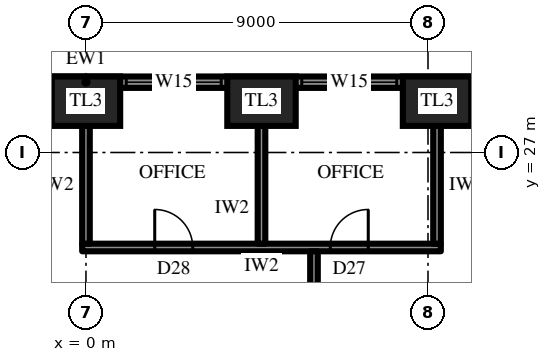
"""IFC4 building model, lengths in metres.
Left out: names, types, materials, properties, quantities, classifications, styles, units other than length and angle.
Written with IfcOpenShell. Run it as: python <this file> out.ifc"""

import sys

from ifc_helpers import new_model, si_unit, direction, frame, frame_2d, origin, origin_2d, place, context, subcontext, project, spatial, rectangle, extrude, element, fill, save


model = new_model("IFC4")
c1 = context("Model", 3, precision=1e-05, world=origin(), true_north=direction((0.0, 1.0)))
c2 = subcontext(c1, "Body", "Model", "MODEL_VIEW")
j1 = project(units=[si_unit("LENGTHUNIT", "METRE"), si_unit("PLANEANGLEUNIT", "RADIAN")], contexts=[c1])
p1 = place(None, origin())
s1 = spatial("IfcSite", under=j1, at=p1, CompositionType="ELEMENT")
p2 = place(p1, origin())
s2 = spatial("IfcBuilding", under=s1, at=p2, CompositionType="ELEMENT")
p3 = place(p2, frame((0.0, 0.0, 295.3)))
s3 = spatial("IfcBuildingStorey", under=s2, at=p3, CompositionType="ELEMENT", Elevation=295.3)
for number, where, z_axis, x_axis in (
    (1, (9.238, 28.35, 0.0), (0.0, 0.0, 1.0), (-1.0, 0.0, 0.0)),
    (2, (4.619, 28.35, 0.0), (0.0, 0.0, 1.0), (-1.0, 0.0, 0.0)),
    (3, (0.0, 28.35, 0.0), (0.0, 0.0, 1.0), (-1.0, 0.0, 0.0)),
):
    element("IfcColumn", number, at=place(p3, frame(where, z_axis=z_axis, x_axis=x_axis)), inside=s3, PredefinedType="COLUMN", context=c2, shape_type="SweptSolid", body=[
        extrude(rectangle(XDim=1.8, YDim=1.3, at=origin_2d()), origin(), (0.0, 0.0, 1.0), 4.2),
    ])
p4 = place(p3, frame((13.856, 28.85, 0.0), z_axis=(0.0, 0.0, 1.0), x_axis=(-1.0, 0.0, 0.0)))
e4 = element("IfcWall", 4, at=p4, inside=s3, PredefinedType="SOLIDWALL", context=c2, shape_type="SweptSolid", body=[
    extrude(rectangle(XDim=27.713, YDim=0.3, at=frame_2d((13.856, 0.0))), origin(), (0.0, 0.0, 1.0), 1.9),
])
p5 = place(p4, frame((1.059, 0.0, 0.6)))
e5 = element("IfcOpeningElement", 5, at=p5, cuts=e4, PredefinedType="OPENING", context=c2, shape_type="SweptSolid", body=[
    extrude(rectangle(XDim=2.5, YDim=1.05, at=frame_2d((1.25, 0.525))), frame((0.0, 0.16, 0.0), z_axis=(0.0, -1.0, 0.0), x_axis=(1.0, 0.0, 0.0)), (0.0, 0.0, 1.0), 0.32),
])
p6 = place(p4, frame((5.678, 0.0, 0.6)))
e6 = element("IfcOpeningElement", 6, at=p6, cuts=e4, PredefinedType="OPENING", context=c2, shape_type="SweptSolid", body=[
    extrude(rectangle(XDim=2.5, YDim=1.05, at=frame_2d((1.25, 0.525))), frame((0.0, 0.16, 0.0), z_axis=(0.0, -1.0, 0.0), x_axis=(1.0, 0.0, 0.0)), (0.0, 0.0, 1.0), 0.32),
])
p7 = place(p4, frame((10.297, 0.0, 0.6)))
e7 = element("IfcOpeningElement", 7, at=p7, cuts=e4, PredefinedType="OPENING", context=c2, shape_type="SweptSolid", body=[
    extrude(rectangle(XDim=2.5, YDim=1.05, at=frame_2d((1.25, 0.525))), frame((0.0, 0.16, 0.0), z_axis=(0.0, -1.0, 0.0), x_axis=(1.0, 0.0, 0.0)), (0.0, 0.0, 1.0), 0.32),
])
p8 = place(p4, frame((14.916, 0.0, 0.6)))
e8 = element("IfcOpeningElement", 8, at=p8, cuts=e4, PredefinedType="OPENING", context=c2, shape_type="SweptSolid", body=[
    extrude(rectangle(XDim=2.5, YDim=1.05, at=frame_2d((1.25, 0.525))), frame((0.0, 0.16, 0.0), z_axis=(0.0, -1.0, 0.0), x_axis=(1.0, 0.0, 0.0)), (0.0, 0.0, 1.0), 0.32),
])
p9 = place(p4, frame((19.535, 0.0, 0.6)))
e9 = element("IfcOpeningElement", 9, at=p9, cuts=e4, PredefinedType="OPENING", context=c2, shape_type="SweptSolid", body=[
    extrude(rectangle(XDim=2.5, YDim=1.05, at=frame_2d((1.25, 0.525))), frame((0.0, 0.16, 0.0), z_axis=(0.0, -1.0, 0.0), x_axis=(1.0, 0.0, 0.0)), (0.0, 0.0, 1.0), 0.32),
])
p10 = place(p4, frame((24.153, 0.0, 0.6)))
e10 = element("IfcOpeningElement", 10, at=p10, cuts=e4, PredefinedType="OPENING", context=c2, shape_type="SweptSolid", body=[
    extrude(rectangle(XDim=2.5, YDim=1.05, at=frame_2d((1.25, 0.525))), frame((0.0, 0.16, 0.0), z_axis=(0.0, -1.0, 0.0), x_axis=(1.0, 0.0, 0.0)), (0.0, 0.0, 1.0), 0.32),
])
p11 = place(p3, frame((9.338, 24.5, 0.0), z_axis=(0.0, 0.0, 1.0), x_axis=(-1.0, 0.0, 0.0)))
e11 = element("IfcWall", 11, at=p11, inside=s3, PredefinedType="PARTITIONING", context=c2, shape_type="SweptSolid", body=[
    extrude(rectangle(XDim=9.438, YDim=0.2, at=frame_2d((4.719, 0.0))), origin(), (0.0, 0.0, 1.0), 3.9),
])
p12 = place(p11, frame((1.909, 0.0, 0.0)))
e12 = element("IfcOpeningElement", 12, at=p12, cuts=e11, PredefinedType="OPENING", context=c2, shape_type="SweptSolid", body=[
    extrude(rectangle(XDim=1.0, YDim=2.2, at=frame_2d((0.5, 1.1))), frame((0.0, 0.11, 0.0), z_axis=(0.0, -1.0, 0.0), x_axis=(1.0, 0.0, 0.0)), (0.0, 0.0, 1.0), 0.22),
])
p13 = place(p11, frame((6.528, 0.0, 0.0)))
e13 = element("IfcOpeningElement", 13, at=p13, cuts=e11, PredefinedType="OPENING", context=c2, shape_type="SweptSolid", body=[
    extrude(rectangle(XDim=1.0, YDim=2.2, at=frame_2d((0.5, 1.1))), frame((0.0, 0.11, 0.0), z_axis=(0.0, -1.0, 0.0), x_axis=(1.0, 0.0, 0.0)), (0.0, 0.0, 1.0), 0.22),
])
for number, where, z_axis, x_axis in (
    (14, (9.238, 24.6, 0.0), (0.0, 0.0, 1.0), (0.0, 1.0, 0.0)),
    (15, (4.619, 24.6, 0.0), (0.0, 0.0, 1.0), (0.0, 1.0, 0.0)),
    (16, (0.0, 24.6, 0.0), (0.0, 0.0, 1.0), (0.0, 1.0, 0.0)),
):
    element("IfcWall", number, at=place(p3, frame(where, z_axis=z_axis, x_axis=x_axis)), inside=s3, PredefinedType="PARTITIONING", context=c2, shape_type="SweptSolid", body=[
        extrude(rectangle(XDim=3.1, YDim=0.2, at=frame_2d((1.55, 0.0))), origin(), (0.0, 0.0, 1.0), 2.844),
    ])
p14 = place(p3, frame((6.0, 17.7, 0.0), z_axis=(0.0, 0.0, 1.0), x_axis=(0.0, 1.0, 0.0)))
e17 = element("IfcWall", 17, at=p14, inside=s3, PredefinedType="PARTITIONING", context=c2, shape_type="SweptSolid", body=[
    extrude(rectangle(XDim=6.7, YDim=0.2, at=frame_2d((3.35, 0.0))), origin(), (0.0, 0.0, 1.0), 3.9),
])
p15 = place(p6, origin())
e18 = element("IfcWindow", 18, at=p15, inside=s3, PartitioningType="SINGLE_PANEL", PredefinedType="WINDOW", context=c2, shape_type="SweptSolid", body=[
    extrude(rectangle(XDim=2.5, YDim=1.05, at=frame_2d((1.25, 0.525))), frame((0.0, 0.03, 0.0), z_axis=(0.0, -1.0, 0.0), x_axis=(1.0, 0.0, 0.0)), (0.0, 0.0, 1.0), 0.06),
])
fill(e6, e18)
p16 = place(p7, origin())
e19 = element("IfcWindow", 19, at=p16, inside=s3, PartitioningType="SINGLE_PANEL", PredefinedType="WINDOW", context=c2, shape_type="SweptSolid", body=[
    extrude(rectangle(XDim=2.5, YDim=1.05, at=frame_2d((1.25, 0.525))), frame((0.0, 0.03, 0.0), z_axis=(0.0, -1.0, 0.0), x_axis=(1.0, 0.0, 0.0)), (0.0, 0.0, 1.0), 0.06),
])
fill(e7, e19)
p17 = place(p12, frame((1.0, 0.0, 0.0), z_axis=(0.0, 0.0, 1.0), x_axis=(-1.0, 0.0, 0.0)))
e20 = element("IfcDoor", 20, at=p17, inside=s3, OperationType="SINGLE_SWING_LEFT", PredefinedType="DOOR", context=c2, shape_type="SweptSolid", body=[
    extrude(rectangle(XDim=1.0, YDim=2.2, at=frame_2d((0.5, 1.1))), frame((0.0, 0.025, 0.0), z_axis=(0.0, -1.0, 0.0), x_axis=(1.0, 0.0, 0.0)), (0.0, 0.0, 1.0), 0.05),
])
fill(e12, e20)
p18 = place(p13, frame((1.0, 0.0, 0.0), z_axis=(0.0, 0.0, 1.0), x_axis=(-1.0, 0.0, 0.0)))
e21 = element("IfcDoor", 21, at=p18, inside=s3, OperationType="SINGLE_SWING_RIGHT", PredefinedType="DOOR", context=c2, shape_type="SweptSolid", body=[
    extrude(rectangle(XDim=1.0, YDim=2.2, at=frame_2d((0.5, 1.1))), frame((0.0, 0.025, 0.0), z_axis=(0.0, -1.0, 0.0), x_axis=(1.0, 0.0, 0.0)), (0.0, 0.0, 1.0), 0.05),
])
fill(e13, e21)
save(model, sys.argv[1])
